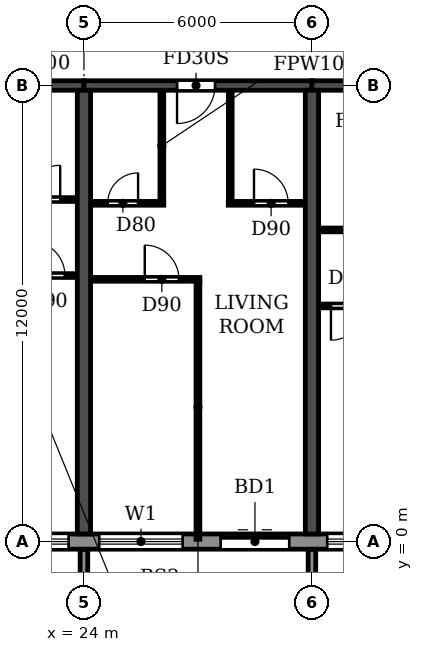
"""IFC4 building model, lengths in metres.
Left out: names, types, materials, properties, quantities, classifications, styles, units other than length and angle.
Written with IfcOpenShell. Run it as: python <this file> out.ifc"""

import sys

from ifc_helpers import new_model, si_unit, direction, frame, frame_2d, origin, place, context, subcontext, project, spatial, polyline, rectangle, outline, extrude, source, transform, mapped, element, fill, save


model = new_model("IFC4")
c1 = context("Model", 3, precision=1e-05, world=origin(), true_north=direction((0.0, 1.0)))
c2 = subcontext(c1, "Body", "Model", "MODEL_VIEW")
j1 = project(units=[si_unit("LENGTHUNIT", "METRE"), si_unit("PLANEANGLEUNIT", "RADIAN")], contexts=[c1])
p1 = place(None, origin())
s1 = spatial("IfcSite", under=j1, at=p1, CompositionType="ELEMENT")
p2 = place(p1, origin())
s2 = spatial("IfcBuilding", under=s1, at=p2, CompositionType="ELEMENT")
p3 = place(p2, frame((0.0, 0.0, 76.2)))
s3 = spatial("IfcBuildingStorey", under=s2, at=p3, CompositionType="ELEMENT", Elevation=76.2)
for number, where, z_axis, x_axis in (
    (1, (24.0, 0.2, 0.0), (0.0, 0.0, 1.0), (0.0, 1.0, 0.0)),
    (2, (30.0, 0.2, 0.0), (0.0, 0.0, 1.0), (0.0, 1.0, 0.0)),
):
    element("IfcWall", number, at=place(p3, frame(where, z_axis=z_axis, x_axis=x_axis)), inside=s3, PredefinedType="SHEAR", context=c2, shape_type="SweptSolid", body=[
        extrude(rectangle(XDim=11.675, YDim=0.35, at=frame_2d((5.837, 0.0))), origin(), (0.0, 0.0, 1.0), 3.06),
    ])
p4 = place(p3, frame((18.0, 12.0, 0.0), z_axis=(0.0, 0.0, 1.0), x_axis=(1.0, 0.0, 0.0)))
e3 = element("IfcWall", 3, at=p4, inside=s3, PredefinedType="SHEAR", context=c2, shape_type="SweptSolid", body=[
    extrude(rectangle(XDim=6.0, YDim=0.25, at=frame_2d((3.0, 0.0))), origin(), (0.0, 0.0, 1.0), 2.46),
])
p5 = place(p4, frame((2.45, 0.0, 0.0)))
e4 = element("IfcOpeningElement", 4, at=p5, cuts=e3, PredefinedType="OPENING", context=c2, shape_type="SweptSolid", body=[
    extrude(rectangle(XDim=1.0, YDim=2.1, at=frame_2d((0.5, 1.05))), frame((0.0, 0.135, 0.0), z_axis=(0.0, -1.0, 0.0), x_axis=(1.0, 0.0, 0.0)), (0.0, 0.0, 1.0), 0.27),
])
p6 = place(p3, frame((24.0, 12.0, 0.0), z_axis=(0.0, 0.0, 1.0), x_axis=(1.0, 0.0, 0.0)))
e5 = element("IfcWall", 5, at=p6, inside=s3, PredefinedType="SHEAR", context=c2, shape_type="SweptSolid", body=[
    extrude(rectangle(XDim=6.0, YDim=0.25, at=frame_2d((3.0, 0.0))), origin(), (0.0, 0.0, 1.0), 2.46),
])
p7 = place(p6, frame((2.45, 0.0, 0.0)))
e6 = element("IfcOpeningElement", 6, at=p7, cuts=e5, PredefinedType="OPENING", context=c2, shape_type="SweptSolid", body=[
    extrude(rectangle(XDim=1.0, YDim=2.1, at=frame_2d((0.5, 1.05))), frame((0.0, 0.135, 0.0), z_axis=(0.0, -1.0, 0.0), x_axis=(1.0, 0.0, 0.0)), (0.0, 0.0, 1.0), 0.27),
])
p8 = place(p3, frame((30.0, 12.0, 0.0), z_axis=(0.0, 0.0, 1.0), x_axis=(1.0, 0.0, 0.0)))
e7 = element("IfcWall", 7, at=p8, inside=s3, PredefinedType="SHEAR", context=c2, shape_type="SweptSolid", body=[
    extrude(rectangle(XDim=6.0, YDim=0.25, at=frame_2d((3.0, 0.0))), origin(), (0.0, 0.0, 1.0), 2.46),
])
p9 = place(p3, frame((10.683, 0.0, 0.0), z_axis=(0.0, 0.0, 1.0), x_axis=(1.0, 0.0, 0.0)))
e8 = element("IfcWall", 8, at=p9, inside=s3, PredefinedType="STANDARD", context=c2, shape_type="SweptSolid", body=[
    extrude(rectangle(XDim=80.634, YDim=0.4, at=frame_2d((40.317, 0.0))), origin(), (0.0, 0.0, 1.0), 3.06),
])
p10 = place(p9, frame((1.717, 0.0, 0.9)))
e9 = element("IfcOpeningElement", 9, at=p10, cuts=e8, PredefinedType="OPENING", context=c2, shape_type="SweptSolid", body=[
    extrude(rectangle(XDim=2.2, YDim=1.5, at=frame_2d((1.1, 0.75))), frame((0.0, 0.21, 0.0), z_axis=(0.0, -1.0, 0.0), x_axis=(1.0, 0.0, 0.0)), (0.0, 0.0, 1.0), 0.42),
])
p11 = place(p9, frame((4.917, 0.0, 0.0)))
e10 = element("IfcOpeningElement", 10, at=p11, cuts=e8, PredefinedType="OPENING", context=c2, shape_type="SweptSolid", body=[
    extrude(rectangle(XDim=1.8, YDim=2.4, at=frame_2d((0.9, 1.2))), frame((0.0, 0.21, 0.0), z_axis=(0.0, -1.0, 0.0), x_axis=(1.0, 0.0, 0.0)), (0.0, 0.0, 1.0), 0.42),
])
p12 = place(p9, frame((7.717, 0.0, 0.9)))
e11 = element("IfcOpeningElement", 11, at=p12, cuts=e8, PredefinedType="OPENING", context=c2, shape_type="SweptSolid", body=[
    extrude(rectangle(XDim=2.2, YDim=1.5, at=frame_2d((1.1, 0.75))), frame((0.0, 0.21, 0.0), z_axis=(0.0, -1.0, 0.0), x_axis=(1.0, 0.0, 0.0)), (0.0, 0.0, 1.0), 0.42),
])
p13 = place(p9, frame((10.717, 0.0, 0.9)))
e12 = element("IfcOpeningElement", 12, at=p13, cuts=e8, PredefinedType="OPENING", context=c2, shape_type="SweptSolid", body=[
    extrude(rectangle(XDim=2.2, YDim=1.5, at=frame_2d((1.1, 0.75))), frame((0.0, 0.21, 0.0), z_axis=(0.0, -1.0, 0.0), x_axis=(1.0, 0.0, 0.0)), (0.0, 0.0, 1.0), 0.42),
])
p14 = place(p9, frame((13.717, 0.0, 0.9)))
e13 = element("IfcOpeningElement", 13, at=p14, cuts=e8, PredefinedType="OPENING", context=c2, shape_type="SweptSolid", body=[
    extrude(rectangle(XDim=2.2, YDim=1.5, at=frame_2d((1.1, 0.75))), frame((0.0, 0.21, 0.0), z_axis=(0.0, -1.0, 0.0), x_axis=(1.0, 0.0, 0.0)), (0.0, 0.0, 1.0), 0.42),
])
p15 = place(p9, frame((16.917, 0.0, 0.0)))
e14 = element("IfcOpeningElement", 14, at=p15, cuts=e8, PredefinedType="OPENING", context=c2, shape_type="SweptSolid", body=[
    extrude(rectangle(XDim=1.8, YDim=2.4, at=frame_2d((0.9, 1.2))), frame((0.0, 0.21, 0.0), z_axis=(0.0, -1.0, 0.0), x_axis=(1.0, 0.0, 0.0)), (0.0, 0.0, 1.0), 0.42),
])
p16 = place(p9, frame((19.717, 0.0, 0.9)))
e15 = element("IfcOpeningElement", 15, at=p16, cuts=e8, PredefinedType="OPENING", context=c2, shape_type="SweptSolid", body=[
    extrude(rectangle(XDim=2.2, YDim=1.5, at=frame_2d((1.1, 0.75))), frame((0.0, 0.21, 0.0), z_axis=(0.0, -1.0, 0.0), x_axis=(1.0, 0.0, 0.0)), (0.0, 0.0, 1.0), 0.42),
])
p17 = place(p9, frame((22.717, 0.0, 0.9)))
e16 = element("IfcOpeningElement", 16, at=p17, cuts=e8, PredefinedType="OPENING", context=c2, shape_type="SweptSolid", body=[
    extrude(rectangle(XDim=2.2, YDim=1.5, at=frame_2d((1.1, 0.75))), frame((0.0, 0.21, 0.0), z_axis=(0.0, -1.0, 0.0), x_axis=(1.0, 0.0, 0.0)), (0.0, 0.0, 1.0), 0.42),
])
p18 = place(p9, frame((25.917, 0.0, 0.0)))
e17 = element("IfcOpeningElement", 17, at=p18, cuts=e8, PredefinedType="OPENING", context=c2, shape_type="SweptSolid", body=[
    extrude(rectangle(XDim=1.8, YDim=2.4, at=frame_2d((0.9, 1.2))), frame((0.0, 0.21, 0.0), z_axis=(0.0, -1.0, 0.0), x_axis=(1.0, 0.0, 0.0)), (0.0, 0.0, 1.0), 0.42),
])
p19 = place(p9, frame((28.717, 0.0, 0.9)))
e18 = element("IfcOpeningElement", 18, at=p19, cuts=e8, PredefinedType="OPENING", context=c2, shape_type="SweptSolid", body=[
    extrude(rectangle(XDim=2.2, YDim=1.5, at=frame_2d((1.1, 0.75))), frame((0.0, 0.21, 0.0), z_axis=(0.0, -1.0, 0.0), x_axis=(1.0, 0.0, 0.0)), (0.0, 0.0, 1.0), 0.42),
])
p20 = place(p9, frame((31.717, 0.0, 0.9)))
e19 = element("IfcOpeningElement", 19, at=p20, cuts=e8, PredefinedType="OPENING", context=c2, shape_type="SweptSolid", body=[
    extrude(rectangle(XDim=2.2, YDim=1.5, at=frame_2d((1.1, 0.75))), frame((0.0, 0.21, 0.0), z_axis=(0.0, -1.0, 0.0), x_axis=(1.0, 0.0, 0.0)), (0.0, 0.0, 1.0), 0.42),
])
p21 = place(p9, frame((34.717, 0.0, 0.9)))
e20 = element("IfcOpeningElement", 20, at=p21, cuts=e8, PredefinedType="OPENING", context=c2, shape_type="SweptSolid", body=[
    extrude(rectangle(XDim=2.2, YDim=1.5, at=frame_2d((1.1, 0.75))), frame((0.0, 0.21, 0.0), z_axis=(0.0, -1.0, 0.0), x_axis=(1.0, 0.0, 0.0)), (0.0, 0.0, 1.0), 0.42),
])
p22 = place(p9, frame((37.917, 0.0, 0.0)))
e21 = element("IfcOpeningElement", 21, at=p22, cuts=e8, PredefinedType="OPENING", context=c2, shape_type="SweptSolid", body=[
    extrude(rectangle(XDim=1.8, YDim=2.4, at=frame_2d((0.9, 1.2))), frame((0.0, 0.21, 0.0), z_axis=(0.0, -1.0, 0.0), x_axis=(1.0, 0.0, 0.0)), (0.0, 0.0, 1.0), 0.42),
])
p23 = place(p9, frame((40.717, 0.0, 0.9)))
e22 = element("IfcOpeningElement", 22, at=p23, cuts=e8, PredefinedType="OPENING", context=c2, shape_type="SweptSolid", body=[
    extrude(rectangle(XDim=2.2, YDim=1.5, at=frame_2d((1.1, 0.75))), frame((0.0, 0.21, 0.0), z_axis=(0.0, -1.0, 0.0), x_axis=(1.0, 0.0, 0.0)), (0.0, 0.0, 1.0), 0.42),
])
p24 = place(p9, frame((43.717, 0.0, 0.9)))
e23 = element("IfcOpeningElement", 23, at=p24, cuts=e8, PredefinedType="OPENING", context=c2, shape_type="SweptSolid", body=[
    extrude(rectangle(XDim=2.2, YDim=1.5, at=frame_2d((1.1, 0.75))), frame((0.0, 0.21, 0.0), z_axis=(0.0, -1.0, 0.0), x_axis=(1.0, 0.0, 0.0)), (0.0, 0.0, 1.0), 0.42),
])
p25 = place(p9, frame((46.717, 0.0, 0.9)))
e24 = element("IfcOpeningElement", 24, at=p25, cuts=e8, PredefinedType="OPENING", context=c2, shape_type="SweptSolid", body=[
    extrude(rectangle(XDim=2.2, YDim=1.5, at=frame_2d((1.1, 0.75))), frame((0.0, 0.21, 0.0), z_axis=(0.0, -1.0, 0.0), x_axis=(1.0, 0.0, 0.0)), (0.0, 0.0, 1.0), 0.42),
])
p26 = place(p9, frame((49.917, 0.0, 0.0)))
e25 = element("IfcOpeningElement", 25, at=p26, cuts=e8, PredefinedType="OPENING", context=c2, shape_type="SweptSolid", body=[
    extrude(rectangle(XDim=1.8, YDim=2.4, at=frame_2d((0.9, 1.2))), frame((0.0, 0.21, 0.0), z_axis=(0.0, -1.0, 0.0), x_axis=(1.0, 0.0, 0.0)), (0.0, 0.0, 1.0), 0.42),
])
p27 = place(p9, frame((52.717, 0.0, 0.9)))
e26 = element("IfcOpeningElement", 26, at=p27, cuts=e8, PredefinedType="OPENING", context=c2, shape_type="SweptSolid", body=[
    extrude(rectangle(XDim=2.2, YDim=1.5, at=frame_2d((1.1, 0.75))), frame((0.0, 0.21, 0.0), z_axis=(0.0, -1.0, 0.0), x_axis=(1.0, 0.0, 0.0)), (0.0, 0.0, 1.0), 0.42),
])
p28 = place(p9, frame((55.717, 0.0, 0.9)))
e27 = element("IfcOpeningElement", 27, at=p28, cuts=e8, PredefinedType="OPENING", context=c2, shape_type="SweptSolid", body=[
    extrude(rectangle(XDim=2.2, YDim=1.5, at=frame_2d((1.1, 0.75))), frame((0.0, 0.21, 0.0), z_axis=(0.0, -1.0, 0.0), x_axis=(1.0, 0.0, 0.0)), (0.0, 0.0, 1.0), 0.42),
])
p29 = place(p9, frame((58.717, 0.0, 0.9)))
e28 = element("IfcOpeningElement", 28, at=p29, cuts=e8, PredefinedType="OPENING", context=c2, shape_type="SweptSolid", body=[
    extrude(rectangle(XDim=2.2, YDim=1.5, at=frame_2d((1.1, 0.75))), frame((0.0, 0.21, 0.0), z_axis=(0.0, -1.0, 0.0), x_axis=(1.0, 0.0, 0.0)), (0.0, 0.0, 1.0), 0.42),
])
p30 = place(p9, frame((61.717, 0.0, 0.9)))
e29 = element("IfcOpeningElement", 29, at=p30, cuts=e8, PredefinedType="OPENING", context=c2, shape_type="SweptSolid", body=[
    extrude(rectangle(XDim=2.2, YDim=1.5, at=frame_2d((1.1, 0.75))), frame((0.0, 0.21, 0.0), z_axis=(0.0, -1.0, 0.0), x_axis=(1.0, 0.0, 0.0)), (0.0, 0.0, 1.0), 0.42),
])
p31 = place(p9, frame((64.917, 0.0, 0.0)))
e30 = element("IfcOpeningElement", 30, at=p31, cuts=e8, PredefinedType="OPENING", context=c2, shape_type="SweptSolid", body=[
    extrude(rectangle(XDim=1.8, YDim=2.4, at=frame_2d((0.9, 1.2))), frame((0.0, 0.21, 0.0), z_axis=(0.0, -1.0, 0.0), x_axis=(1.0, 0.0, 0.0)), (0.0, 0.0, 1.0), 0.42),
])
p32 = place(p9, frame((67.717, 0.0, 0.9)))
e31 = element("IfcOpeningElement", 31, at=p32, cuts=e8, PredefinedType="OPENING", context=c2, shape_type="SweptSolid", body=[
    extrude(rectangle(XDim=2.2, YDim=1.5, at=frame_2d((1.1, 0.75))), frame((0.0, 0.21, 0.0), z_axis=(0.0, -1.0, 0.0), x_axis=(1.0, 0.0, 0.0)), (0.0, 0.0, 1.0), 0.42),
])
p33 = place(p9, frame((70.717, 0.0, 0.9)))
e32 = element("IfcOpeningElement", 32, at=p33, cuts=e8, PredefinedType="OPENING", context=c2, shape_type="SweptSolid", body=[
    extrude(rectangle(XDim=2.2, YDim=1.5, at=frame_2d((1.1, 0.75))), frame((0.0, 0.21, 0.0), z_axis=(0.0, -1.0, 0.0), x_axis=(1.0, 0.0, 0.0)), (0.0, 0.0, 1.0), 0.42),
])
p34 = place(p9, frame((73.917, 0.0, 0.0)))
e33 = element("IfcOpeningElement", 33, at=p34, cuts=e8, PredefinedType="OPENING", context=c2, shape_type="SweptSolid", body=[
    extrude(rectangle(XDim=1.8, YDim=2.4, at=frame_2d((0.9, 1.2))), frame((0.0, 0.21, 0.0), z_axis=(0.0, -1.0, 0.0), x_axis=(1.0, 0.0, 0.0)), (0.0, 0.0, 1.0), 0.42),
])
p35 = place(p9, frame((76.717, 0.0, 0.9)))
e34 = element("IfcOpeningElement", 34, at=p35, cuts=e8, PredefinedType="OPENING", context=c2, shape_type="SweptSolid", body=[
    extrude(rectangle(XDim=2.2, YDim=1.5, at=frame_2d((1.1, 0.75))), frame((0.0, 0.21, 0.0), z_axis=(0.0, -1.0, 0.0), x_axis=(1.0, 0.0, 0.0)), (0.0, 0.0, 1.0), 0.42),
])
m1 = source(origin(), c2, "Body", "SweptSolid", [
    extrude(outline(polyline([(0.0, 0.0), (0.2, 0.0), (0.2, 1.65), (0.0, 1.65), (0.0, 0.0)])), origin(), (0.0, 0.0, 1.0), 3.1),
])
for number, where in (
    (35, (23.9, -1.85, 0.0)),
    (36, (29.9, -1.85, 0.0)),
):
    element("IfcWall", number, at=place(p3, frame(where)), inside=s3, PredefinedType="STANDARD", context=c2, shape_type="MappedRepresentation", body=[
        mapped(m1, transform((0.0, 0.0, 0.0))),
    ])
p36 = place(p3, frame((30.185, 6.2, 0.0), z_axis=(0.0, 0.0, 1.0), x_axis=(1.0, 0.0, 0.0)))
e37 = element("IfcWall", 37, at=p36, inside=s3, PredefinedType="PARTITIONING", context=c2, shape_type="SweptSolid", body=[
    extrude(rectangle(XDim=5.63, YDim=0.1, at=frame_2d((2.815, 0.0))), origin(), (0.0, 0.0, 1.0), 3.06),
])
p37 = place(p36, frame((0.315, 0.0, 0.0)))
e38 = element("IfcOpeningElement", 38, at=p37, cuts=e37, PredefinedType="OPENING", context=c2, shape_type="SweptSolid", body=[
    extrude(rectangle(XDim=0.9, YDim=2.1, at=frame_2d((0.45, 1.05))), frame((0.0, 0.06, 0.0), z_axis=(0.0, -1.0, 0.0), x_axis=(1.0, 0.0, 0.0)), (0.0, 0.0, 1.0), 0.12),
])
p38 = place(p36, frame((4.415, 0.0, 0.0)))
e39 = element("IfcOpeningElement", 39, at=p38, cuts=e37, PredefinedType="OPENING", context=c2, shape_type="SweptSolid", body=[
    extrude(rectangle(XDim=0.9, YDim=2.1, at=frame_2d((0.45, 1.05))), frame((0.0, 0.06, 0.0), z_axis=(0.0, -1.0, 0.0), x_axis=(1.0, 0.0, 0.0)), (0.0, 0.0, 1.0), 0.12),
])
p39 = place(p3, frame((24.185, 6.9, 0.0), z_axis=(0.0, 0.0, 1.0), x_axis=(1.0, 0.0, 0.0)))
e40 = element("IfcWall", 40, at=p39, inside=s3, PredefinedType="PARTITIONING", context=c2, shape_type="SweptSolid", body=[
    extrude(rectangle(XDim=2.865, YDim=0.1, at=frame_2d((1.433, 0.0))), origin(), (0.0, 0.0, 1.0), 3.06),
])
p40 = place(p39, frame((1.415, 0.0, 0.0)))
e41 = element("IfcOpeningElement", 41, at=p40, cuts=e40, PredefinedType="OPENING", context=c2, shape_type="SweptSolid", body=[
    extrude(rectangle(XDim=0.9, YDim=2.1, at=frame_2d((0.45, 1.05))), frame((0.0, 0.06, 0.0), z_axis=(0.0, -1.0, 0.0), x_axis=(1.0, 0.0, 0.0)), (0.0, 0.0, 1.0), 0.12),
])
p41 = place(p3, frame((20.95, 7.0, 0.0), z_axis=(0.0, 0.0, 1.0), x_axis=(1.0, 0.0, 0.0)))
e42 = element("IfcWall", 42, at=p41, inside=s3, PredefinedType="PARTITIONING", context=c2, shape_type="SweptSolid", body=[
    extrude(rectangle(XDim=2.865, YDim=0.1, at=frame_2d((1.433, 0.0))), origin(), (0.0, 0.0, 1.0), 3.06),
])
p42 = place(p41, frame((1.65, 0.0, 0.0)))
e43 = element("IfcOpeningElement", 43, at=p42, cuts=e42, PredefinedType="OPENING", context=c2, shape_type="SweptSolid", body=[
    extrude(rectangle(XDim=0.9, YDim=2.1, at=frame_2d((0.45, 1.05))), frame((0.0, 0.06, 0.0), z_axis=(0.0, -1.0, 0.0), x_axis=(1.0, 0.0, 0.0)), (0.0, 0.0, 1.0), 0.12),
])
p43 = place(p3, frame((30.185, 8.2, 0.0), z_axis=(0.0, 0.0, 1.0), x_axis=(1.0, 0.0, 0.0)))
e44 = element("IfcWall", 44, at=p43, inside=s3, PredefinedType="PARTITIONING", context=c2, shape_type="SweptSolid", body=[
    extrude(rectangle(XDim=3.165, YDim=0.1, at=frame_2d((1.583, 0.0))), origin(), (0.0, 0.0, 1.0), 3.06),
])
p44 = place(p43, frame((1.065, 0.0, 0.0)))
e45 = element("IfcOpeningElement", 45, at=p44, cuts=e44, PredefinedType="OPENING", context=c2, shape_type="SweptSolid", body=[
    extrude(rectangle(XDim=0.8, YDim=2.1, at=frame_2d((0.4, 1.05))), frame((0.0, 0.06, 0.0), z_axis=(0.0, -1.0, 0.0), x_axis=(1.0, 0.0, 0.0)), (0.0, 0.0, 1.0), 0.12),
])
p45 = place(p3, frame((24.185, 8.9, 0.0), z_axis=(0.0, 0.0, 1.0), x_axis=(1.0, 0.0, 0.0)))
e46 = element("IfcWall", 46, at=p45, inside=s3, PredefinedType="PARTITIONING", context=c2, shape_type="SweptSolid", body=[
    extrude(rectangle(XDim=1.915, YDim=0.1, at=frame_2d((0.958, 0.0))), origin(), (0.0, 0.0, 1.0), 3.06),
])
p46 = place(p45, frame((0.44, 0.0, 0.0)))
e47 = element("IfcOpeningElement", 47, at=p46, cuts=e46, PredefinedType="OPENING", context=c2, shape_type="SweptSolid", body=[
    extrude(rectangle(XDim=0.8, YDim=2.1, at=frame_2d((0.4, 1.05))), frame((0.0, 0.06, 0.0), z_axis=(0.0, -1.0, 0.0), x_axis=(1.0, 0.0, 0.0)), (0.0, 0.0, 1.0), 0.12),
])
p47 = place(p3, frame((27.8, 8.9, 0.0), z_axis=(0.0, 0.0, 1.0), x_axis=(1.0, 0.0, 0.0)))
e48 = element("IfcWall", 48, at=p47, inside=s3, PredefinedType="PARTITIONING", context=c2, shape_type="SweptSolid", body=[
    extrude(rectangle(XDim=2.015, YDim=0.1, at=frame_2d((1.007, 0.0))), origin(), (0.0, 0.0, 1.0), 3.06),
])
p48 = place(p47, frame((0.675, 0.0, 0.0)))
e49 = element("IfcOpeningElement", 49, at=p48, cuts=e48, PredefinedType="OPENING", context=c2, shape_type="SweptSolid", body=[
    extrude(rectangle(XDim=0.9, YDim=2.1, at=frame_2d((0.45, 1.05))), frame((0.0, 0.06, 0.0), z_axis=(0.0, -1.0, 0.0), x_axis=(1.0, 0.0, 0.0)), (0.0, 0.0, 1.0), 0.12),
])
p49 = place(p3, frame((21.8, 9.0, 0.0), z_axis=(0.0, 0.0, 1.0), x_axis=(1.0, 0.0, 0.0)))
e50 = element("IfcWall", 50, at=p49, inside=s3, PredefinedType="PARTITIONING", context=c2, shape_type="SweptSolid", body=[
    extrude(rectangle(XDim=2.015, YDim=0.1, at=frame_2d((1.007, 0.0))), origin(), (0.0, 0.0, 1.0), 3.06),
])
p50 = place(p49, frame((0.675, 0.0, 0.0)))
e51 = element("IfcOpeningElement", 51, at=p50, cuts=e50, PredefinedType="OPENING", context=c2, shape_type="SweptSolid", body=[
    extrude(rectangle(XDim=0.9, YDim=2.1, at=frame_2d((0.45, 1.05))), frame((0.0, 0.06, 0.0), z_axis=(0.0, -1.0, 0.0), x_axis=(1.0, 0.0, 0.0)), (0.0, 0.0, 1.0), 0.12),
])
p51 = place(p3, frame((26.05, 8.95, 0.0), z_axis=(0.0, 0.0, 1.0), x_axis=(0.0, 1.0, 0.0)))
e52 = element("IfcWall", 52, at=p51, inside=s3, PredefinedType="PARTITIONING", context=c2, shape_type="SweptSolid", body=[
    extrude(rectangle(XDim=2.915, YDim=0.1, at=frame_2d((1.458, 0.0))), origin(), (0.0, 0.0, 1.0), 3.06),
])
p52 = place(p3, frame((27.0, 0.06, 0.0), z_axis=(0.0, 0.0, 1.0), x_axis=(0.0, 1.0, 0.0)))
e53 = element("IfcWall", 53, at=p52, inside=s3, PredefinedType="PARTITIONING", context=c2, shape_type="SweptSolid", body=[
    extrude(rectangle(XDim=6.79, YDim=0.1, at=frame_2d((3.395, 0.0))), origin(), (0.0, 0.0, 1.0), 3.06),
])
p53 = place(p3, frame((27.85, 8.95, 0.0), z_axis=(0.0, 0.0, 1.0), x_axis=(0.0, 1.0, 0.0)))
e54 = element("IfcWall", 54, at=p53, inside=s3, PredefinedType="PARTITIONING", context=c2, shape_type="SweptSolid", body=[
    extrude(rectangle(XDim=2.915, YDim=0.1, at=frame_2d((1.458, 0.0))), origin(), (0.0, 0.0, 1.0), 3.06),
])
p54 = place(p13, origin())
e55 = element("IfcWindow", 55, at=p54, inside=s3, PartitioningType="DOUBLE_PANEL_HORIZONTAL", PredefinedType="WINDOW", context=c2, shape_type="SweptSolid", body=[
    extrude(rectangle(XDim=2.2, YDim=1.5, at=frame_2d((1.1, 0.75))), frame((0.0, 0.03, 0.0), z_axis=(0.0, -1.0, 0.0), x_axis=(1.0, 0.0, 0.0)), (0.0, 0.0, 1.0), 0.06),
])
fill(e12, e55)
p55 = place(p14, origin())
e56 = element("IfcWindow", 56, at=p55, inside=s3, PartitioningType="DOUBLE_PANEL_HORIZONTAL", PredefinedType="WINDOW", context=c2, shape_type="SweptSolid", body=[
    extrude(rectangle(XDim=2.2, YDim=1.5, at=frame_2d((1.1, 0.75))), frame((0.0, 0.03, 0.0), z_axis=(0.0, -1.0, 0.0), x_axis=(1.0, 0.0, 0.0)), (0.0, 0.0, 1.0), 0.06),
])
fill(e13, e56)
p56 = place(p15, origin())
e57 = element("IfcDoor", 57, at=p56, inside=s3, OperationType="DOUBLE_DOOR_SLIDING", PredefinedType="DOOR", context=c2, shape_type="SweptSolid", body=[
    extrude(rectangle(XDim=1.8, YDim=2.4, at=frame_2d((0.9, 1.2))), frame((0.0, 0.025, 0.0), z_axis=(0.0, -1.0, 0.0), x_axis=(1.0, 0.0, 0.0)), (0.0, 0.0, 1.0), 0.05),
])
fill(e14, e57)
p57 = place(p16, origin())
e58 = element("IfcWindow", 58, at=p57, inside=s3, PartitioningType="DOUBLE_PANEL_HORIZONTAL", PredefinedType="WINDOW", context=c2, shape_type="SweptSolid", body=[
    extrude(rectangle(XDim=2.2, YDim=1.5, at=frame_2d((1.1, 0.75))), frame((0.0, 0.03, 0.0), z_axis=(0.0, -1.0, 0.0), x_axis=(1.0, 0.0, 0.0)), (0.0, 0.0, 1.0), 0.06),
])
fill(e15, e58)
p58 = place(p50, origin())
e59 = element("IfcDoor", 59, at=p58, inside=s3, OperationType="SINGLE_SWING_RIGHT", PredefinedType="DOOR", context=c2, shape_type="SweptSolid", body=[
    extrude(rectangle(XDim=0.9, YDim=2.1, at=frame_2d((0.45, 1.05))), frame((0.0, 0.025, 0.0), z_axis=(0.0, -1.0, 0.0), x_axis=(1.0, 0.0, 0.0)), (0.0, 0.0, 1.0), 0.05),
])
fill(e51, e59)
p59 = place(p42, origin())
e60 = element("IfcDoor", 60, at=p59, inside=s3, OperationType="SINGLE_SWING_LEFT", PredefinedType="DOOR", context=c2, shape_type="SweptSolid", body=[
    extrude(rectangle(XDim=0.9, YDim=2.1, at=frame_2d((0.45, 1.05))), frame((0.0, 0.025, 0.0), z_axis=(0.0, -1.0, 0.0), x_axis=(1.0, 0.0, 0.0)), (0.0, 0.0, 1.0), 0.05),
])
fill(e43, e60)
p60 = place(p46, origin())
e61 = element("IfcDoor", 61, at=p60, inside=s3, OperationType="SINGLE_SWING_RIGHT", PredefinedType="DOOR", context=c2, shape_type="SweptSolid", body=[
    extrude(rectangle(XDim=0.8, YDim=2.1, at=frame_2d((0.4, 1.05))), frame((0.0, 0.025, 0.0), z_axis=(0.0, -1.0, 0.0), x_axis=(1.0, 0.0, 0.0)), (0.0, 0.0, 1.0), 0.05),
])
fill(e47, e61)
p61 = place(p40, origin())
e62 = element("IfcDoor", 62, at=p61, inside=s3, OperationType="SINGLE_SWING_LEFT", PredefinedType="DOOR", context=c2, shape_type="SweptSolid", body=[
    extrude(rectangle(XDim=0.9, YDim=2.1, at=frame_2d((0.45, 1.05))), frame((0.0, 0.025, 0.0), z_axis=(0.0, -1.0, 0.0), x_axis=(1.0, 0.0, 0.0)), (0.0, 0.0, 1.0), 0.05),
])
fill(e41, e62)
p62 = place(p7, frame((1.0, 0.0, 0.0), z_axis=(0.0, 0.0, 1.0), x_axis=(-1.0, 0.0, 0.0)))
e63 = element("IfcDoor", 63, at=p62, inside=s3, OperationType="SINGLE_SWING_RIGHT", PredefinedType="DOOR", context=c2, shape_type="SweptSolid", body=[
    extrude(rectangle(XDim=1.0, YDim=2.1, at=frame_2d((0.5, 1.05))), frame((0.0, 0.025, 0.0), z_axis=(0.0, -1.0, 0.0), x_axis=(1.0, 0.0, 0.0)), (0.0, 0.0, 1.0), 0.05),
])
fill(e6, e63)
p63 = place(p48, origin())
e64 = element("IfcDoor", 64, at=p63, inside=s3, OperationType="SINGLE_SWING_LEFT", PredefinedType="DOOR", context=c2, shape_type="SweptSolid", body=[
    extrude(rectangle(XDim=0.9, YDim=2.1, at=frame_2d((0.45, 1.05))), frame((0.0, 0.025, 0.0), z_axis=(0.0, -1.0, 0.0), x_axis=(1.0, 0.0, 0.0)), (0.0, 0.0, 1.0), 0.05),
])
fill(e49, e64)
p64 = place(p37, frame((0.9, 0.0, 0.0), z_axis=(0.0, 0.0, 1.0), x_axis=(-1.0, 0.0, 0.0)))
e65 = element("IfcDoor", 65, at=p64, inside=s3, OperationType="SINGLE_SWING_RIGHT", PredefinedType="DOOR", context=c2, shape_type="SweptSolid", body=[
    extrude(rectangle(XDim=0.9, YDim=2.1, at=frame_2d((0.45, 1.05))), frame((0.0, 0.025, 0.0), z_axis=(0.0, -1.0, 0.0), x_axis=(1.0, 0.0, 0.0)), (0.0, 0.0, 1.0), 0.05),
])
fill(e38, e65)
save(model, sys.argv[1])
